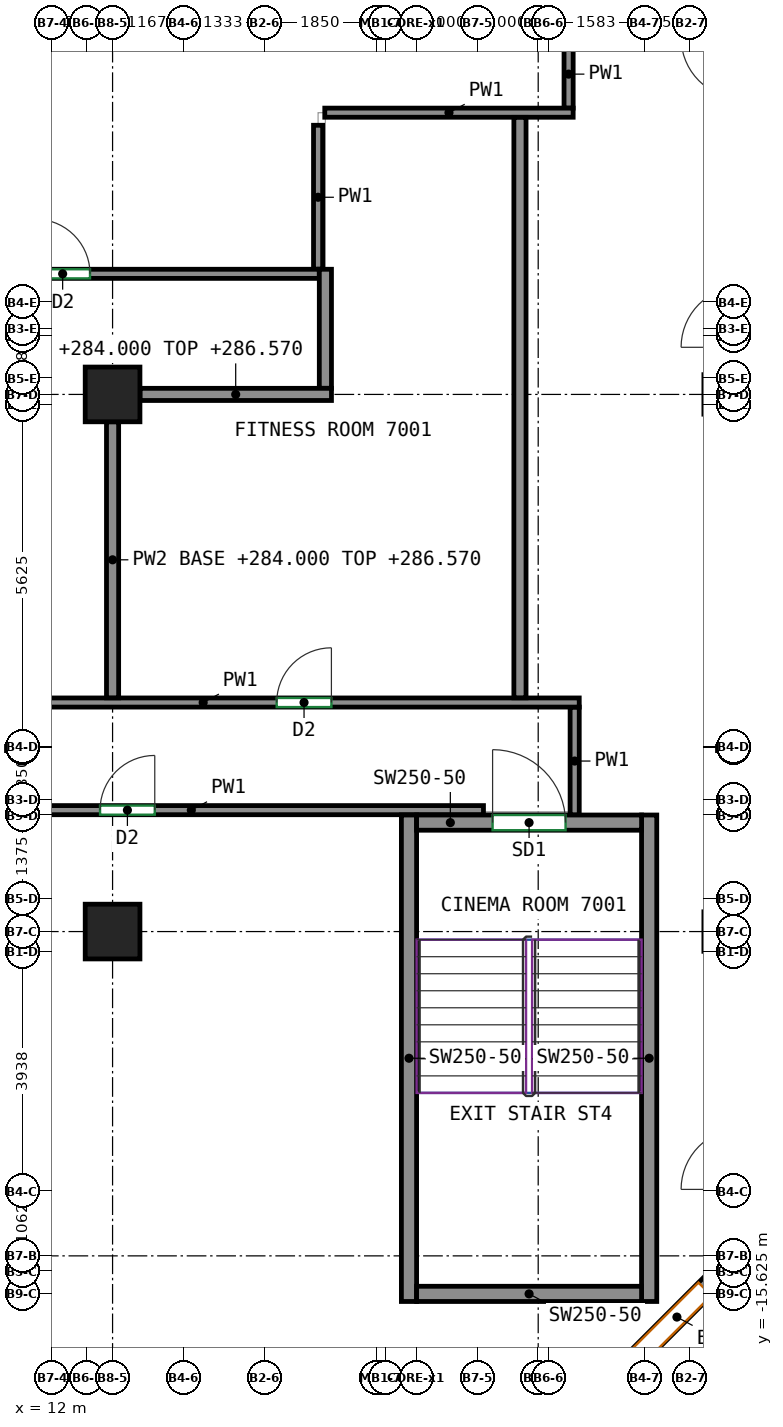
"""IFC4 building model, lengths in metres.
Left out: names, types, materials, properties, quantities, classifications, styles, units other than length and angle.
Written with IfcOpenShell. Run it as: python <this file> out.ifc"""

import sys

from ifc_helpers import new_model, si_unit, direction, frame, frame_2d, origin, origin_2d, place, context, subcontext, project, spatial, rectangle, extrude, source, transform, mapped, element, fill, save


model = new_model("IFC4")
c1 = context("Model", 3, precision=1e-05, world=origin(), true_north=direction((0.0, 1.0)))
c2 = subcontext(c1, "Body", "Model", "MODEL_VIEW")
j1 = project(units=[si_unit("LENGTHUNIT", "METRE"), si_unit("PLANEANGLEUNIT", "RADIAN")], contexts=[c1])
p1 = place(None, origin())
s1 = spatial("IfcSite", under=j1, at=p1, CompositionType="ELEMENT")
p2 = place(p1, origin())
s2 = spatial("IfcBuilding", under=s1, at=p2, CompositionType="ELEMENT")
p3 = place(p2, frame((0.0, 0.0, 284.0)))
s3 = spatial("IfcBuildingStorey", under=s2, at=p3, CompositionType="ELEMENT", Elevation=284.0)
m1 = source(origin(), c2, "Body", "SweptSolid", [
    extrude(rectangle(XDim=0.9, YDim=0.9, at=origin_2d()), origin(), (0.0, 0.0, 1.0), 3.12),
])
for number, where, z_axis, x_axis in (
    (1, (13.0, -9.667, 0.0), (0.0, 0.0, 1.0), (1.0, 0.0, 0.0)),
    (2, (13.0, -0.833, 0.0), (0.0, 0.0, 1.0), (1.0, 0.0, 0.0)),
):
    element("IfcColumn", number, at=place(p3, frame(where, z_axis=z_axis, x_axis=x_axis)), inside=s3, PredefinedType="COLUMN", context=c2, shape_type="MappedRepresentation", body=[
        mapped(m1, transform((0.0, 0.0, 0.0))),
    ])
m2 = source(origin(), c2, "Body", "SweptSolid", [
    extrude(rectangle(XDim=8.0, YDim=0.25, at=frame_2d((4.0, 0.0))), origin(), (0.0, 0.0, 1.0), 3.12),
])
for number, where, z_axis, x_axis in (
    (3, (17.875, -15.75, 0.0), (0.0, 0.0, 1.0), (0.0, 1.0, 0.0)),
    (4, (21.825, -15.75, 0.0), (0.0, 0.0, 1.0), (0.0, 1.0, 0.0)),
):
    element("IfcWall", number, at=place(p3, frame(where, z_axis=z_axis, x_axis=x_axis)), inside=s3, PredefinedType="SHEAR", context=c2, shape_type="MappedRepresentation", body=[
        mapped(m2, transform((0.0, 0.0, 0.0))),
    ])
m3 = source(origin(), c2, "Body", "SweptSolid", [
    extrude(rectangle(XDim=3.7, YDim=0.25, at=frame_2d((1.85, 0.0))), origin(), (0.0, 0.0, 1.0), 3.12),
])
p4 = place(p3, frame((18.0, -15.625, 0.0), z_axis=(0.0, 0.0, 1.0), x_axis=(1.0, 0.0, 0.0)))
e5 = element("IfcWall", 5, at=p4, inside=s3, PredefinedType="SHEAR", context=c2, shape_type="MappedRepresentation", body=[
    mapped(m3, transform((0.0, 0.0, 0.0))),
])
p5 = place(p3, frame((18.0, -7.875, 0.0), z_axis=(0.0, 0.0, 1.0), x_axis=(1.0, 0.0, 0.0)))
e6 = element("IfcWall", 6, at=p5, inside=s3, PredefinedType="SHEAR", context=c2, shape_type="MappedRepresentation", body=[
    mapped(m3, transform((0.0, 0.0, 0.0))),
])
p6 = place(p5, frame((1.25, 0.0, 0.0)))
e7 = element("IfcOpeningElement", 7, at=p6, cuts=e6, PredefinedType="OPENING", context=c2, shape_type="SweptSolid", body=[
    extrude(rectangle(XDim=1.2, YDim=2.1, at=frame_2d((0.6, 1.05))), frame((0.0, 0.135, 0.0), z_axis=(0.0, -1.0, 0.0), x_axis=(1.0, 0.0, 0.0)), (0.0, 0.0, 1.0), 0.27),
])
m4 = source(origin(), c2, "Body", "SweptSolid", [
    extrude(rectangle(XDim=3.712, YDim=0.3, at=frame_2d((1.856, 0.0))), origin(), (0.0, 0.0, 1.0), 3.12),
])
p7 = place(p3, frame((20.444, -17.844, 0.0), z_axis=(0.0, 0.0, 1.0), x_axis=(0.707106781187, 0.707106781187, 0.0)))
e8 = element("IfcWall", 8, at=p7, inside=s3, PredefinedType="SOLIDWALL", context=c2, shape_type="MappedRepresentation", body=[
    mapped(m4, transform((0.0, 0.0, 0.0))),
])
p8 = place(p7, frame((1.75, 0.0, 0.8)))
e9 = element("IfcOpeningElement", 9, at=p8, cuts=e8, PredefinedType="OPENING", context=c2, shape_type="SweptSolid", body=[
    extrude(rectangle(XDim=1.5, YDim=2.05, at=frame_2d((0.75, 1.025))), frame((0.0, 0.16, 0.0), z_axis=(0.0, -1.0, 0.0), x_axis=(1.0, 0.0, 0.0)), (0.0, 0.0, 1.0), 0.32),
])
p9 = place(p7, frame((0.45, 0.0, 0.0)))
e10 = element("IfcOpeningElement", 10, at=p9, cuts=e8, PredefinedType="OPENING", context=c2, shape_type="SweptSolid", body=[
    extrude(rectangle(XDim=1.0, YDim=2.1, at=frame_2d((0.5, 1.05))), frame((0.0, 0.16, 0.0), z_axis=(0.0, -1.0, 0.0), x_axis=(1.0, 0.0, 0.0)), (0.0, 0.0, 1.0), 0.32),
])
p10 = place(p3, frame((20.5, 3.875, 0.0), z_axis=(0.0, 0.0, 1.0), x_axis=(0.0, 1.0, 0.0)))
e11 = element("IfcWall", 11, at=p10, inside=s3, PredefinedType="PARTITIONING", context=c2, shape_type="SweptSolid", body=[
    extrude(rectangle(XDim=1.118, YDim=0.15, at=frame_2d((0.559, 0.0))), origin(), (0.0, 0.0, 1.0), 3.12),
])
p11 = place(p3, frame((20.6, -7.75, 0.0), z_axis=(0.0, 0.0, 1.0), x_axis=(0.0, 1.0, 0.0)))
e12 = element("IfcWall", 12, at=p11, inside=s3, PredefinedType="PARTITIONING", context=c2, shape_type="SweptSolid", body=[
    extrude(rectangle(XDim=1.775, YDim=0.15, at=frame_2d((0.887, 0.0))), origin(), (0.0, 0.0, 1.0), 3.12),
])
p12 = place(p3, frame((9.49, -7.67, 0.0), z_axis=(0.0, 0.0, 1.0), x_axis=(1.0, 0.0, 0.0)))
e13 = element("IfcWall", 13, at=p12, inside=s3, PredefinedType="PARTITIONING", context=c2, shape_type="SweptSolid", body=[
    extrude(rectangle(XDim=9.61, YDim=0.15, at=frame_2d((4.805, 0.0))), origin(), (0.0, 0.0, 1.0), 3.12),
])
p13 = place(p12, frame((3.304, 0.0, 0.0)))
e14 = element("IfcOpeningElement", 14, at=p13, cuts=e13, PredefinedType="OPENING", context=c2, shape_type="SweptSolid", body=[
    extrude(rectangle(XDim=0.9, YDim=2.1, at=frame_2d((0.45, 1.05))), frame((0.0, 0.085, 0.0), z_axis=(0.0, -1.0, 0.0), x_axis=(1.0, 0.0, 0.0)), (0.0, 0.0, 1.0), 0.17),
])
p14 = place(p3, frame((16.38, 1.225, 0.0), z_axis=(0.0, 0.0, 1.0), x_axis=(0.0, 1.0, 0.0)))
e15 = element("IfcWall", 15, at=p14, inside=s3, PredefinedType="PARTITIONING", context=c2, shape_type="SweptSolid", body=[
    extrude(rectangle(XDim=2.368, YDim=0.15, at=frame_2d((1.184, 0.0))), origin(), (0.0, 0.0, 1.0), 3.12),
])
p15 = place(p3, frame((8.305, 1.15, 0.0), z_axis=(0.0, 0.0, 1.0), x_axis=(1.0, 0.0, 0.0)))
e16 = element("IfcWall", 16, at=p15, inside=s3, PredefinedType="PARTITIONING", context=c2, shape_type="SweptSolid", body=[
    extrude(rectangle(XDim=8.095, YDim=0.15, at=frame_2d((4.047, 0.0))), origin(), (0.0, 0.0, 1.0), 3.12),
])
p16 = place(p15, frame((3.424, 0.0, 0.0)))
e17 = element("IfcOpeningElement", 17, at=p16, cuts=e16, PredefinedType="OPENING", context=c2, shape_type="SweptSolid", body=[
    extrude(rectangle(XDim=0.9, YDim=2.1, at=frame_2d((0.45, 1.05))), frame((0.0, 0.085, 0.0), z_axis=(0.0, -1.0, 0.0), x_axis=(1.0, 0.0, 0.0)), (0.0, 0.0, 1.0), 0.17),
])
p17 = place(p3, frame((8.305, -5.9, 0.0), z_axis=(0.0, 0.0, 1.0), x_axis=(1.0, 0.0, 0.0)))
e18 = element("IfcWall", 18, at=p17, inside=s3, PredefinedType="PARTITIONING", context=c2, shape_type="SweptSolid", body=[
    extrude(rectangle(XDim=12.37, YDim=0.15, at=frame_2d((6.185, 0.0))), origin(), (0.0, 0.0, 1.0), 3.12),
])
p18 = place(p17, frame((7.394, 0.0, 0.0)))
e19 = element("IfcOpeningElement", 19, at=p18, cuts=e18, PredefinedType="OPENING", context=c2, shape_type="SweptSolid", body=[
    extrude(rectangle(XDim=0.9, YDim=2.1, at=frame_2d((0.45, 1.05))), frame((0.0, 0.085, 0.0), z_axis=(0.0, -1.0, 0.0), x_axis=(1.0, 0.0, 0.0)), (0.0, 0.0, 1.0), 0.17),
])
p19 = place(p3, frame((16.49, 3.8, 0.0), z_axis=(0.0, 0.0, 1.0), x_axis=(1.0, 0.0, 0.0)))
e20 = element("IfcWall", 20, at=p19, inside=s3, PredefinedType="PARTITIONING", context=c2, shape_type="SweptSolid", body=[
    extrude(rectangle(XDim=4.085, YDim=0.15, at=frame_2d((2.042, 0.0))), origin(), (0.0, 0.0, 1.0), 3.12),
])
p20 = place(p3, frame((19.7, 3.723, 0.0), z_axis=(0.0, 0.0, 1.0), x_axis=(0.0, -1.0, 0.0)))
e21 = element("IfcWall", 21, at=p20, inside=s3, PredefinedType="PARTITIONING", context=c2, shape_type="SweptSolid", body=[
    extrude(rectangle(XDim=9.546, YDim=0.2, at=frame_2d((4.773, 0.0))), origin(), (0.0, 0.0, 1.0), 3.12),
])
p21 = place(p3, frame((16.5, -0.733, 0.0), z_axis=(0.0, 0.0, 1.0), x_axis=(0.0, 1.0, 0.0)))
e22 = element("IfcWall", 22, at=p21, inside=s3, PredefinedType="PARTITIONING", context=c2, shape_type="SweptSolid", body=[
    extrude(rectangle(XDim=1.958, YDim=0.2, at=frame_2d((0.979, 0.0))), origin(), (0.0, 0.0, 1.0), 3.12),
])
p22 = place(p3, frame((13.45, -0.833, 0.0), z_axis=(0.0, 0.0, 1.0), x_axis=(1.0, 0.0, 0.0)))
e23 = element("IfcWall", 23, at=p22, inside=s3, PredefinedType="PARTITIONING", context=c2, shape_type="SweptSolid", body=[
    extrude(rectangle(XDim=3.15, YDim=0.2, at=frame_2d((1.575, 0.0))), origin(), (0.0, 0.0, 1.0), 2.57),
])
p23 = place(p3, frame((13.0, -5.823, 0.0), z_axis=(0.0, 0.0, 1.0), x_axis=(0.0, 1.0, 0.0)))
e24 = element("IfcWall", 24, at=p23, inside=s3, PredefinedType="PARTITIONING", context=c2, shape_type="SweptSolid", body=[
    extrude(rectangle(XDim=4.54, YDim=0.2, at=frame_2d((2.27, 0.0))), origin(), (0.0, 0.0, 1.0), 2.57),
])
p24 = place(p8, origin())
e25 = element("IfcWindow", 25, at=p24, inside=s3, PartitioningType="SINGLE_PANEL", PredefinedType="WINDOW", context=c2, shape_type="SweptSolid", body=[
    extrude(rectangle(XDim=1.5, YDim=2.05, at=frame_2d((0.75, 1.025))), frame((0.0, 0.03, 0.0), z_axis=(0.0, -1.0, 0.0), x_axis=(1.0, 0.0, 0.0)), (0.0, 0.0, 1.0), 0.06),
])
fill(e9, e25)
p25 = place(p6, origin())
e26 = element("IfcDoor", 26, at=p25, inside=s3, OperationType="DOUBLE_DOOR_SINGLE_SWING", PredefinedType="DOOR", context=c2, shape_type="SweptSolid", body=[
    extrude(rectangle(XDim=1.2, YDim=2.1, at=frame_2d((0.6, 1.05))), frame((0.0, 0.025, 0.0), z_axis=(0.0, -1.0, 0.0), x_axis=(1.0, 0.0, 0.0)), (0.0, 0.0, 1.0), 0.05),
])
fill(e7, e26)
p26 = place(p13, origin())
e27 = element("IfcDoor", 27, at=p26, inside=s3, OperationType="SINGLE_SWING_RIGHT", PredefinedType="DOOR", context=c2, shape_type="SweptSolid", body=[
    extrude(rectangle(XDim=0.9, YDim=2.1, at=frame_2d((0.45, 1.05))), frame((0.0, 0.025, 0.0), z_axis=(0.0, -1.0, 0.0), x_axis=(1.0, 0.0, 0.0)), (0.0, 0.0, 1.0), 0.05),
])
fill(e14, e27)
p27 = place(p18, origin())
e28 = element("IfcDoor", 28, at=p27, inside=s3, OperationType="SINGLE_SWING_RIGHT", PredefinedType="DOOR", context=c2, shape_type="SweptSolid", body=[
    extrude(rectangle(XDim=0.9, YDim=2.1, at=frame_2d((0.45, 1.05))), frame((0.0, 0.025, 0.0), z_axis=(0.0, -1.0, 0.0), x_axis=(1.0, 0.0, 0.0)), (0.0, 0.0, 1.0), 0.05),
])
fill(e19, e28)
p28 = place(p16, origin())
e29 = element("IfcDoor", 29, at=p28, inside=s3, OperationType="SINGLE_SWING_LEFT", PredefinedType="DOOR", context=c2, shape_type="SweptSolid", body=[
    extrude(rectangle(XDim=0.9, YDim=2.1, at=frame_2d((0.45, 1.05))), frame((0.0, 0.025, 0.0), z_axis=(0.0, -1.0, 0.0), x_axis=(1.0, 0.0, 0.0)), (0.0, 0.0, 1.0), 0.05),
])
fill(e17, e29)
save(model, sys.argv[1])
